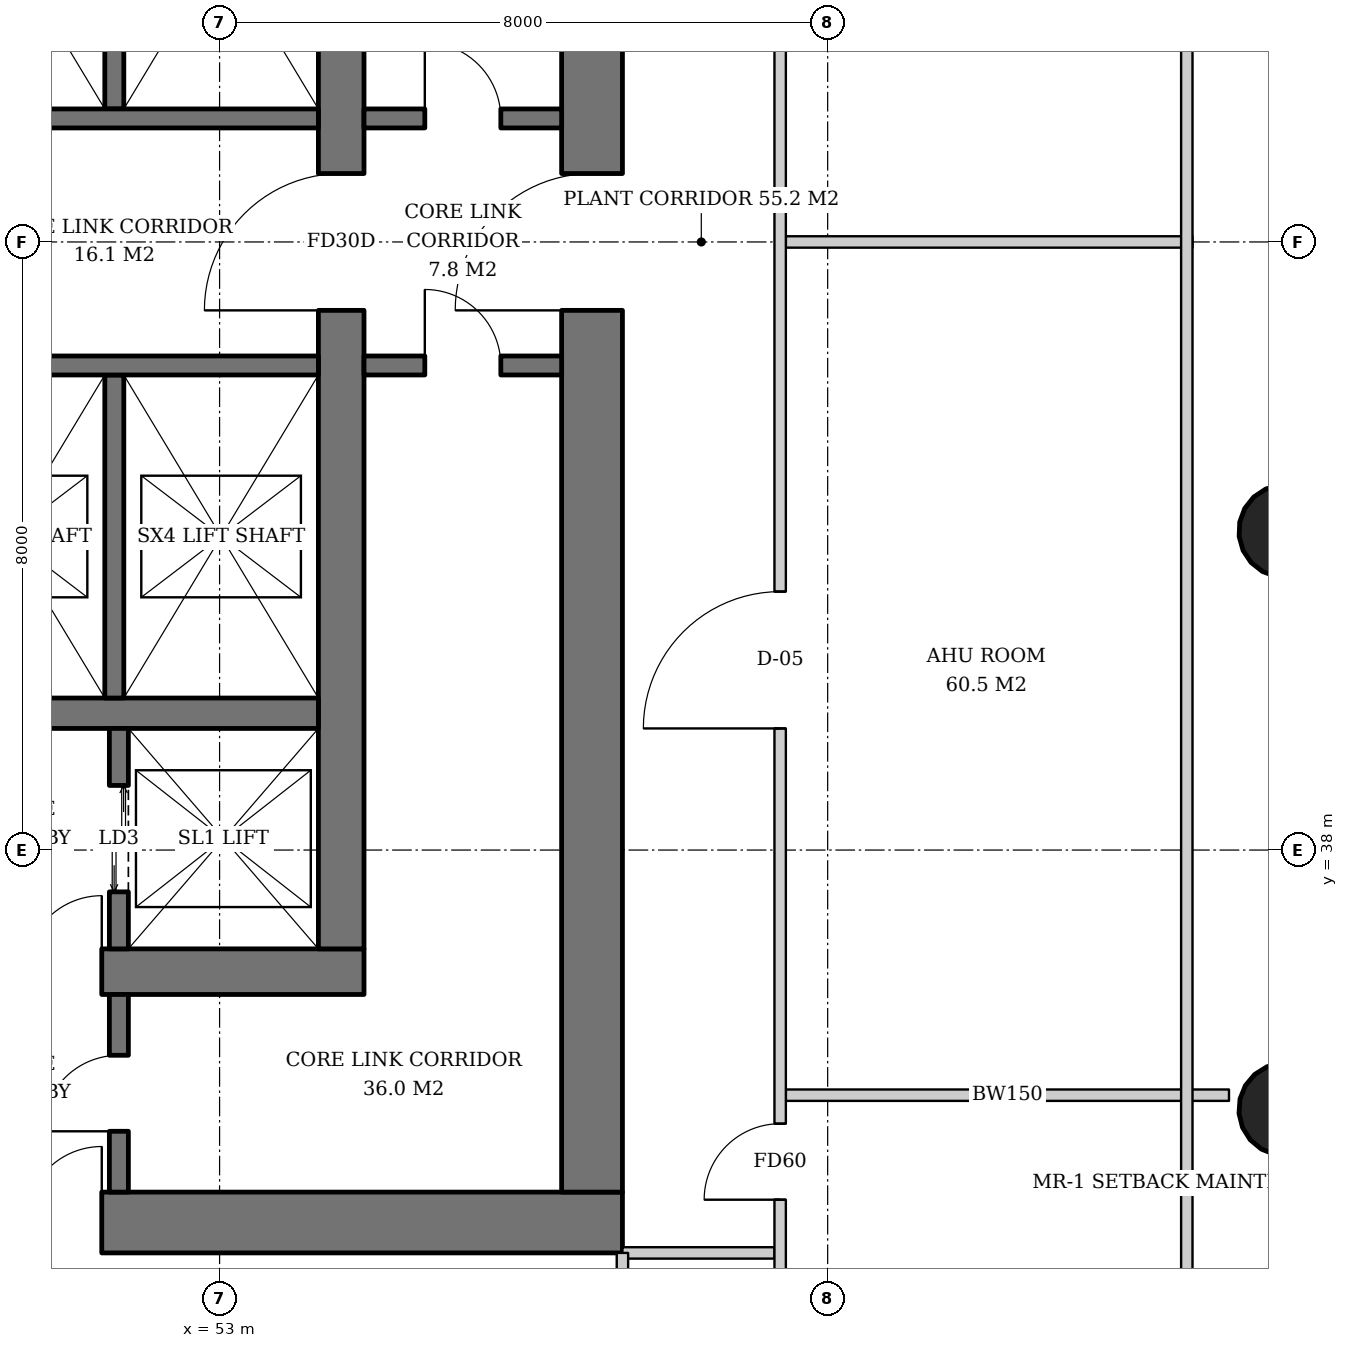
"""IFC4 building model, lengths in metres.
Left out: names, types, materials, properties, quantities, classifications, styles, units other than length and angle.
Written with IfcOpenShell. Run it as: python <this file> out.ifc"""

import sys

from ifc_helpers import new_model, si_unit, direction, frame, frame_2d, origin, origin_2d, place, context, subcontext, project, spatial, rectangle, hollow_circle, extrude, element, fill, save


model = new_model("IFC4")
c1 = context("Model", 3, precision=1e-05, world=origin(), true_north=direction((0.0, 1.0)))
c2 = subcontext(c1, "Body", "Model", "MODEL_VIEW")
j1 = project(units=[si_unit("LENGTHUNIT", "METRE"), si_unit("PLANEANGLEUNIT", "RADIAN")], contexts=[c1])
p1 = place(None, origin())
s1 = spatial("IfcSite", under=j1, at=p1, CompositionType="ELEMENT")
p2 = place(p1, origin())
s2 = spatial("IfcBuilding", under=s1, at=p2, CompositionType="ELEMENT")
p3 = place(p2, frame((0.0, 0.0, 81.8)))
s3 = spatial("IfcBuildingStorey", under=s2, at=p3, CompositionType="ELEMENT", Elevation=81.8)
p4 = place(p3, frame((67.057, 34.566, 0.0), z_axis=(-0.031908467525, 0.019196442233, 0.999306432635), x_axis=(-0.515509579284, -0.856883815734, 0.0)))
e1 = element("IfcColumn", 1, at=p4, inside=s3, PredefinedType="COLUMN", context=c2, shape_type="SweptSolid", body=[
    extrude(hollow_circle(Radius=0.61, WallThickness=0.04, at=origin_2d()), origin(), (0.0, 0.0, 1.0), 3.803),
])
p5 = place(p3, frame((67.057, 42.188, 0.0), z_axis=(-0.031913690376, 0.006421265669, 0.999470001408), x_axis=(-0.197254006954, -0.980352414563, 0.0)))
e2 = element("IfcColumn", 2, at=p5, inside=s3, PredefinedType="COLUMN", context=c2, shape_type="SweptSolid", body=[
    extrude(hollow_circle(Radius=0.61, WallThickness=0.04, at=origin_2d()), origin(), (0.0, 0.0, 1.0), 3.802),
])
p6 = place(p3, frame((35.1, 36.4, 0.0), z_axis=(0.0, 0.0, 1.0), x_axis=(1.0, 0.0, 0.0)))
e3 = element("IfcWall", 3, at=p6, inside=s3, PredefinedType="SHEAR", context=c2, shape_type="SweptSolid", body=[
    extrude(rectangle(XDim=19.8, YDim=0.6, at=frame_2d((9.9, 0.0))), origin(), (0.0, 0.0, 1.0), 3.8),
])
p7 = place(p6, frame((3.9, 0.0, 0.0)))
e4 = element("IfcOpeningElement", 4, at=p7, cuts=e3, PredefinedType="OPENING", context=c2, shape_type="SweptSolid", body=[
    extrude(rectangle(XDim=1.0, YDim=2.1, at=frame_2d((0.5, 1.05))), frame((0.0, 0.31, 0.0), z_axis=(0.0, -1.0, 0.0), x_axis=(1.0, 0.0, 0.0)), (0.0, 0.0, 1.0), 0.62),
])
p8 = place(p6, frame((15.35, 0.0, 0.0)))
e5 = element("IfcOpeningElement", 5, at=p8, cuts=e3, PredefinedType="OPENING", context=c2, shape_type="SweptSolid", body=[
    extrude(rectangle(XDim=1.0, YDim=2.1, at=frame_2d((0.5, 1.05))), frame((0.0, 0.31, 0.0), z_axis=(0.0, -1.0, 0.0), x_axis=(1.0, 0.0, 0.0)), (0.0, 0.0, 1.0), 0.62),
])
p9 = place(p3, frame((54.6, 36.7, 0.0), z_axis=(0.0, 0.0, 1.0), x_axis=(0.0, 1.0, 0.0)))
e6 = element("IfcWall", 6, at=p9, inside=s3, PredefinedType="SHEAR", context=c2, shape_type="SweptSolid", body=[
    extrude(rectangle(XDim=18.6, YDim=0.6, at=frame_2d((9.3, 0.0))), origin(), (0.0, 0.0, 1.0), 3.8),
])
p10 = place(p9, frame((8.4, 0.0, 0.0)))
e7 = element("IfcOpeningElement", 7, at=p10, cuts=e6, PredefinedType="OPENING", context=c2, shape_type="SweptSolid", body=[
    extrude(rectangle(XDim=1.8, YDim=2.4, at=frame_2d((0.9, 1.2))), frame((0.0, 0.31, 0.0), z_axis=(0.0, -1.0, 0.0), x_axis=(1.0, 0.0, 0.0)), (0.0, 0.0, 1.0), 0.62),
])
p11 = place(p3, frame((31.7, 33.1, 0.0), z_axis=(0.0, 0.0, 1.0), x_axis=(1.0, 0.0, 0.0)))
e8 = element("IfcWall", 8, at=p11, inside=s3, PredefinedType="SHEAR", context=c2, shape_type="SweptSolid", body=[
    extrude(rectangle(XDim=26.6, YDim=0.8, at=frame_2d((13.3, 0.0))), origin(), (0.0, 0.0, 1.0), 3.8),
])
p12 = place(p11, frame((7.3, 0.0, 0.0)))
e9 = element("IfcOpeningElement", 9, at=p12, cuts=e8, PredefinedType="OPENING", context=c2, shape_type="SweptSolid", body=[
    extrude(rectangle(XDim=1.0, YDim=2.1, at=frame_2d((0.5, 1.05))), frame((0.0, 0.41, 0.0), z_axis=(0.0, -1.0, 0.0), x_axis=(1.0, 0.0, 0.0)), (0.0, 0.0, 1.0), 0.82),
])
p13 = place(p11, frame((18.75, 0.0, 0.0)))
e10 = element("IfcOpeningElement", 10, at=p13, cuts=e8, PredefinedType="OPENING", context=c2, shape_type="SweptSolid", body=[
    extrude(rectangle(XDim=1.0, YDim=2.1, at=frame_2d((0.5, 1.05))), frame((0.0, 0.41, 0.0), z_axis=(0.0, -1.0, 0.0), x_axis=(1.0, 0.0, 0.0)), (0.0, 0.0, 1.0), 0.82),
])
p14 = place(p11, frame((3.25, 0.0, 0.0)))
e11 = element("IfcOpeningElement", 11, at=p14, cuts=e8, PredefinedType="OPENING", context=c2, shape_type="SweptSolid", body=[
    extrude(rectangle(XDim=1.0, YDim=2.1, at=frame_2d((0.5, 1.05))), frame((0.0, 0.41, 0.0), z_axis=(0.0, -1.0, 0.0), x_axis=(1.0, 0.0, 0.0)), (0.0, 0.0, 1.0), 0.82),
])
p15 = place(p3, frame((57.9, 33.5, 0.0), z_axis=(0.0, 0.0, 1.0), x_axis=(0.0, 1.0, 0.0)))
e12 = element("IfcWall", 12, at=p15, inside=s3, PredefinedType="SHEAR", context=c2, shape_type="SweptSolid", body=[
    extrude(rectangle(XDim=25.0, YDim=0.8, at=frame_2d((12.5, 0.0))), origin(), (0.0, 0.0, 1.0), 3.8),
])
p16 = place(p15, frame((11.6, 0.0, 0.0)))
e13 = element("IfcOpeningElement", 13, at=p16, cuts=e12, PredefinedType="OPENING", context=c2, shape_type="SweptSolid", body=[
    extrude(rectangle(XDim=1.8, YDim=2.4, at=frame_2d((0.9, 1.2))), frame((0.0, 0.41, 0.0), z_axis=(0.0, -1.0, 0.0), x_axis=(1.0, 0.0, 0.0)), (0.0, 0.0, 1.0), 0.82),
])
p17 = place(p3, frame((35.7, 39.8, 0.0), z_axis=(0.0, 0.0, 1.0), x_axis=(1.0, 0.0, 0.0)))
e14 = element("IfcWall", 14, at=p17, inside=s3, PredefinedType="SHEAR", context=c2, shape_type="SweptSolid", body=[
    extrude(rectangle(XDim=18.6, YDim=0.4, at=frame_2d((9.3, 0.0))), origin(), (0.0, 0.0, 1.0), 3.8),
])
p18 = place(p3, frame((51.675, 36.7, 0.0), z_axis=(0.0, 0.0, 1.0), x_axis=(0.0, 1.0, 0.0)))
e15 = element("IfcWall", 15, at=p18, inside=s3, PredefinedType="SHEAR", context=c2, shape_type="SweptSolid", body=[
    extrude(rectangle(XDim=2.9, YDim=0.25, at=frame_2d((1.45, 0.0))), origin(), (0.0, 0.0, 1.0), 3.8),
])
p19 = place(p18, frame((0.75, 0.0, 0.0)))
e16 = element("IfcOpeningElement", 16, at=p19, cuts=e15, PredefinedType="OPENING", context=c2, shape_type="SweptSolid", body=[
    extrude(rectangle(XDim=1.4, YDim=2.4, at=frame_2d((0.7, 1.2))), frame((0.0, 0.135, 0.0), z_axis=(0.0, -1.0, 0.0), x_axis=(1.0, 0.0, 0.0)), (0.0, 0.0, 1.0), 0.27),
])
p20 = place(p3, frame((51.615, 47.75, 0.0), z_axis=(0.0, 0.0, 1.0), x_axis=(0.0, 1.0, 0.0)))
e17 = element("IfcWall", 17, at=p20, inside=s3, PredefinedType="SHEAR", context=c2, shape_type="SweptSolid", body=[
    extrude(rectangle(XDim=4.25, YDim=0.25, at=frame_2d((2.125, 0.0))), origin(), (0.0, 0.0, 1.0), 3.8),
])
p21 = place(p3, frame((48.93, 47.625, 0.0), z_axis=(0.0, 0.0, 1.0), x_axis=(1.0, 0.0, 0.0)))
e18 = element("IfcWall", 18, at=p21, inside=s3, PredefinedType="SHEAR", context=c2, shape_type="SweptSolid", body=[
    extrude(rectangle(XDim=5.37, YDim=0.25, at=frame_2d((2.685, 0.0))), origin(), (0.0, 0.0, 1.0), 3.8),
])
p22 = place(p3, frame((51.615, 44.25, 0.0), z_axis=(0.0, 0.0, 1.0), x_axis=(0.0, -1.0, 0.0)))
e19 = element("IfcWall", 19, at=p22, inside=s3, PredefinedType="SHEAR", context=c2, shape_type="SweptSolid", body=[
    extrude(rectangle(XDim=4.25, YDim=0.25, at=frame_2d((2.125, 0.0))), origin(), (0.0, 0.0, 1.0), 3.8),
])
p23 = place(p3, frame((48.93, 44.375, 0.0), z_axis=(0.0, 0.0, 1.0), x_axis=(1.0, 0.0, 0.0)))
e20 = element("IfcWall", 20, at=p23, inside=s3, PredefinedType="SHEAR", context=c2, shape_type="SweptSolid", body=[
    extrude(rectangle(XDim=5.37, YDim=0.25, at=frame_2d((2.685, 0.0))), origin(), (0.0, 0.0, 1.0), 3.8),
])
p24 = place(p3, frame((54.9, 44.375, 0.0), z_axis=(0.0, 0.0, 1.0), x_axis=(1.0, 0.0, 0.0)))
e21 = element("IfcWall", 21, at=p24, inside=s3, PredefinedType="SOLIDWALL", context=c2, shape_type="SweptSolid", body=[
    extrude(rectangle(XDim=2.6, YDim=0.25, at=frame_2d((1.3, 0.0))), origin(), (0.0, 0.0, 1.0), 3.52),
])
p25 = place(p24, frame((0.8, 0.0, 0.0)))
e22 = element("IfcOpeningElement", 22, at=p25, cuts=e21, PredefinedType="OPENING", context=c2, shape_type="SweptSolid", body=[
    extrude(rectangle(XDim=1.0, YDim=2.1, at=frame_2d((0.5, 1.05))), frame((0.0, 0.135, 0.0), z_axis=(0.0, -1.0, 0.0), x_axis=(1.0, 0.0, 0.0)), (0.0, 0.0, 1.0), 0.27),
])
p26 = place(p3, frame((54.9, 47.625, 0.0), z_axis=(0.0, 0.0, 1.0), x_axis=(1.0, 0.0, 0.0)))
e23 = element("IfcWall", 23, at=p26, inside=s3, PredefinedType="SOLIDWALL", context=c2, shape_type="SweptSolid", body=[
    extrude(rectangle(XDim=2.6, YDim=0.25, at=frame_2d((1.3, 0.0))), origin(), (0.0, 0.0, 1.0), 3.52),
])
p27 = place(p26, frame((0.8, 0.0, 0.0)))
e24 = element("IfcOpeningElement", 24, at=p27, cuts=e23, PredefinedType="OPENING", context=c2, shape_type="SweptSolid", body=[
    extrude(rectangle(XDim=1.0, YDim=2.1, at=frame_2d((0.5, 1.05))), frame((0.0, 0.135, 0.0), z_axis=(0.0, -1.0, 0.0), x_axis=(1.0, 0.0, 0.0)), (0.0, 0.0, 1.0), 0.27),
])
p28 = place(p3, frame((51.675, 33.5, 0.0), z_axis=(0.0, 0.0, 1.0), x_axis=(0.0, 1.0, 0.0)))
e25 = element("IfcWall", 25, at=p28, inside=s3, PredefinedType="SOLIDWALL", context=c2, shape_type="SweptSolid", body=[
    extrude(rectangle(XDim=2.6, YDim=0.25, at=frame_2d((1.3, 0.0))), origin(), (0.0, 0.0, 1.0), 3.52),
])
p29 = place(p28, frame((0.8, 0.0, 0.0)))
e26 = element("IfcOpeningElement", 26, at=p29, cuts=e25, PredefinedType="OPENING", context=c2, shape_type="SweptSolid", body=[
    extrude(rectangle(XDim=1.0, YDim=2.1, at=frame_2d((0.5, 1.05))), frame((0.0, 0.135, 0.0), z_axis=(0.0, -1.0, 0.0), x_axis=(1.0, 0.0, 0.0)), (0.0, 0.0, 1.0), 0.27),
])
p30 = place(p3, frame((58.3, 32.7, 0.0), z_axis=(0.0, 0.0, 1.0), x_axis=(1.0, 0.0, 0.0)))
e27 = element("IfcWall", 27, at=p30, inside=s3, PredefinedType="PARTITIONING", context=c2, shape_type="SweptSolid", body=[
    extrude(rectangle(XDim=2.0, YDim=0.15, at=frame_2d((1.0, 0.0))), origin(), (0.0, 0.0, 1.0), 2.512),
])
p31 = place(p3, frame((60.45, 34.775, 0.0), z_axis=(0.0, 0.0, 1.0), x_axis=(1.0, 0.0, 0.0)))
e28 = element("IfcWall", 28, at=p31, inside=s3, PredefinedType="SOLIDWALL", context=c2, shape_type="SweptSolid", body=[
    extrude(rectangle(XDim=5.83, YDim=0.15, at=frame_2d((2.915, 0.0))), origin(), (0.0, 0.0, 1.0), 3.52),
])
p32 = place(p3, frame((60.45, 46.0, 0.0), z_axis=(0.0, 0.0, 1.0), x_axis=(1.0, 0.0, 0.0)))
e29 = element("IfcWall", 29, at=p32, inside=s3, PredefinedType="SOLIDWALL", context=c2, shape_type="SweptSolid", body=[
    extrude(rectangle(XDim=5.35, YDim=0.15, at=frame_2d((2.675, 0.0))), origin(), (0.0, 0.0, 1.0), 2.758),
])
p33 = place(p3, frame((60.375, 30.55, 0.0), z_axis=(0.0, 0.0, 1.0), x_axis=(0.0, 1.0, 0.0)))
e30 = element("IfcWall", 30, at=p33, inside=s3, PredefinedType="SOLIDWALL", context=c2, shape_type="SweptSolid", body=[
    extrude(rectangle(XDim=30.75, YDim=0.15, at=frame_2d((15.375, 0.0))), origin(), (0.0, 0.0, 1.0), 2.512),
])
p34 = place(p33, frame((2.85, 0.0, 0.0)))
e31 = element("IfcOpeningElement", 31, at=p34, cuts=e30, PredefinedType="OPENING", context=c2, shape_type="SweptSolid", body=[
    extrude(rectangle(XDim=1.0, YDim=2.1, at=frame_2d((0.5, 1.05))), frame((0.0, 0.085, 0.0), z_axis=(0.0, -1.0, 0.0), x_axis=(1.0, 0.0, 0.0)), (0.0, 0.0, 1.0), 0.17),
])
p35 = place(p33, frame((9.05, 0.0, 0.0)))
e32 = element("IfcOpeningElement", 32, at=p35, cuts=e30, PredefinedType="OPENING", context=c2, shape_type="SweptSolid", body=[
    extrude(rectangle(XDim=1.8, YDim=2.4, at=frame_2d((0.9, 1.2))), frame((0.0, 0.085, 0.0), z_axis=(0.0, -1.0, 0.0), x_axis=(1.0, 0.0, 0.0)), (0.0, 0.0, 1.0), 0.17),
])
p36 = place(p33, frame((19.55, 0.0, 0.0)))
e33 = element("IfcOpeningElement", 33, at=p36, cuts=e30, PredefinedType="OPENING", context=c2, shape_type="SweptSolid", body=[
    extrude(rectangle(XDim=1.8, YDim=2.4, at=frame_2d((0.9, 1.2))), frame((0.0, 0.085, 0.0), z_axis=(0.0, -1.0, 0.0), x_axis=(1.0, 0.0, 0.0)), (0.0, 0.0, 1.0), 0.17),
])
p37 = place(p3, frame((58.3, 32.7, 0.0), z_axis=(0.0, 0.0, 1.0), x_axis=(0.0, -1.0, 0.0)))
e34 = element("IfcWall", 34, at=p37, inside=s3, PredefinedType="PARTITIONING", context=c2, shape_type="SweptSolid", body=[
    extrude(rectangle(XDim=2.0, YDim=0.15, at=frame_2d((1.0, 0.0))), origin(), (0.0, 0.0, 1.0), 3.52),
])
p38 = place(p3, frame((65.725, 63.8, 0.0), z_axis=(0.0, 0.0, 1.0), x_axis=(0.0, -1.0, 0.0)))
e35 = element("IfcWall", 35, at=p38, inside=s3, PredefinedType="PARTITIONING", context=c2, shape_type="SweptSolid", body=[
    extrude(rectangle(XDim=35.6, YDim=0.15, at=frame_2d((17.8, 0.0))), origin(), (0.0, 0.0, 1.0), 2.512),
])
p39 = place(p19, origin())
e36 = element("IfcDoor", 36, at=p39, inside=s3, OperationType="DOUBLE_DOOR_SLIDING", PredefinedType="DOOR", context=c2, shape_type="SweptSolid", body=[
    extrude(rectangle(XDim=1.4, YDim=2.4, at=frame_2d((0.7, 1.2))), frame((0.0, 0.025, 0.0), z_axis=(0.0, -1.0, 0.0), x_axis=(1.0, 0.0, 0.0)), (0.0, 0.0, 1.0), 0.05),
])
fill(e16, e36)
p40 = place(p25, origin())
e37 = element("IfcDoor", 37, at=p40, inside=s3, OperationType="SINGLE_SWING_LEFT", PredefinedType="DOOR", context=c2, shape_type="SweptSolid", body=[
    extrude(rectangle(XDim=1.0, YDim=2.1, at=frame_2d((0.5, 1.05))), frame((0.0, 0.025, 0.0), z_axis=(0.0, -1.0, 0.0), x_axis=(1.0, 0.0, 0.0)), (0.0, 0.0, 1.0), 0.05),
])
fill(e22, e37)
p41 = place(p27, origin())
e38 = element("IfcDoor", 38, at=p41, inside=s3, OperationType="SINGLE_SWING_LEFT", PredefinedType="DOOR", context=c2, shape_type="SweptSolid", body=[
    extrude(rectangle(XDim=1.0, YDim=2.1, at=frame_2d((0.5, 1.05))), frame((0.0, 0.025, 0.0), z_axis=(0.0, -1.0, 0.0), x_axis=(1.0, 0.0, 0.0)), (0.0, 0.0, 1.0), 0.05),
])
fill(e24, e38)
p42 = place(p29, origin())
e39 = element("IfcDoor", 39, at=p42, inside=s3, OperationType="SINGLE_SWING_LEFT", PredefinedType="DOOR", context=c2, shape_type="SweptSolid", body=[
    extrude(rectangle(XDim=1.0, YDim=2.1, at=frame_2d((0.5, 1.05))), frame((0.0, 0.025, 0.0), z_axis=(0.0, -1.0, 0.0), x_axis=(1.0, 0.0, 0.0)), (0.0, 0.0, 1.0), 0.05),
])
fill(e26, e39)
p43 = place(p10, origin())
e40 = element("IfcDoor", 40, at=p43, inside=s3, OperationType="DOUBLE_DOOR_SINGLE_SWING", PredefinedType="DOOR", context=c2, shape_type="SweptSolid", body=[
    extrude(rectangle(XDim=1.8, YDim=2.4, at=frame_2d((0.9, 1.2))), frame((0.0, 0.025, 0.0), z_axis=(0.0, -1.0, 0.0), x_axis=(1.0, 0.0, 0.0)), (0.0, 0.0, 1.0), 0.05),
])
fill(e7, e40)
p44 = place(p8, origin())
e41 = element("IfcDoor", 41, at=p44, inside=s3, OperationType="SINGLE_SWING_RIGHT", PredefinedType="DOOR", context=c2, shape_type="SweptSolid", body=[
    extrude(rectangle(XDim=1.0, YDim=2.1, at=frame_2d((0.5, 1.05))), frame((0.0, 0.025, 0.0), z_axis=(0.0, -1.0, 0.0), x_axis=(1.0, 0.0, 0.0)), (0.0, 0.0, 1.0), 0.05),
])
fill(e5, e41)
p45 = place(p16, origin())
e42 = element("IfcDoor", 42, at=p45, inside=s3, OperationType="DOUBLE_DOOR_SINGLE_SWING", PredefinedType="DOOR", context=c2, shape_type="SweptSolid", body=[
    extrude(rectangle(XDim=1.8, YDim=2.4, at=frame_2d((0.9, 1.2))), frame((0.0, 0.025, 0.0), z_axis=(0.0, -1.0, 0.0), x_axis=(1.0, 0.0, 0.0)), (0.0, 0.0, 1.0), 0.05),
])
fill(e13, e42)
p46 = place(p13, origin())
e43 = element("IfcDoor", 43, at=p46, inside=s3, OperationType="SINGLE_SWING_RIGHT", PredefinedType="DOOR", context=c2, shape_type="SweptSolid", body=[
    extrude(rectangle(XDim=1.0, YDim=2.1, at=frame_2d((0.5, 1.05))), frame((0.0, 0.025, 0.0), z_axis=(0.0, -1.0, 0.0), x_axis=(1.0, 0.0, 0.0)), (0.0, 0.0, 1.0), 0.05),
])
fill(e10, e43)
p47 = place(p34, origin())
e44 = element("IfcDoor", 44, at=p47, inside=s3, OperationType="SINGLE_SWING_LEFT", PredefinedType="DOOR", context=c2, shape_type="SweptSolid", body=[
    extrude(rectangle(XDim=1.0, YDim=2.1, at=frame_2d((0.5, 1.05))), frame((0.0, 0.025, 0.0), z_axis=(0.0, -1.0, 0.0), x_axis=(1.0, 0.0, 0.0)), (0.0, 0.0, 1.0), 0.05),
])
fill(e31, e44)
p48 = place(p35, origin())
e45 = element("IfcDoor", 45, at=p48, inside=s3, OperationType="DOUBLE_DOOR_SINGLE_SWING", PredefinedType="DOOR", context=c2, shape_type="SweptSolid", body=[
    extrude(rectangle(XDim=1.8, YDim=2.4, at=frame_2d((0.9, 1.2))), frame((0.0, 0.025, 0.0), z_axis=(0.0, -1.0, 0.0), x_axis=(1.0, 0.0, 0.0)), (0.0, 0.0, 1.0), 0.05),
])
fill(e32, e45)
save(model, sys.argv[1])
